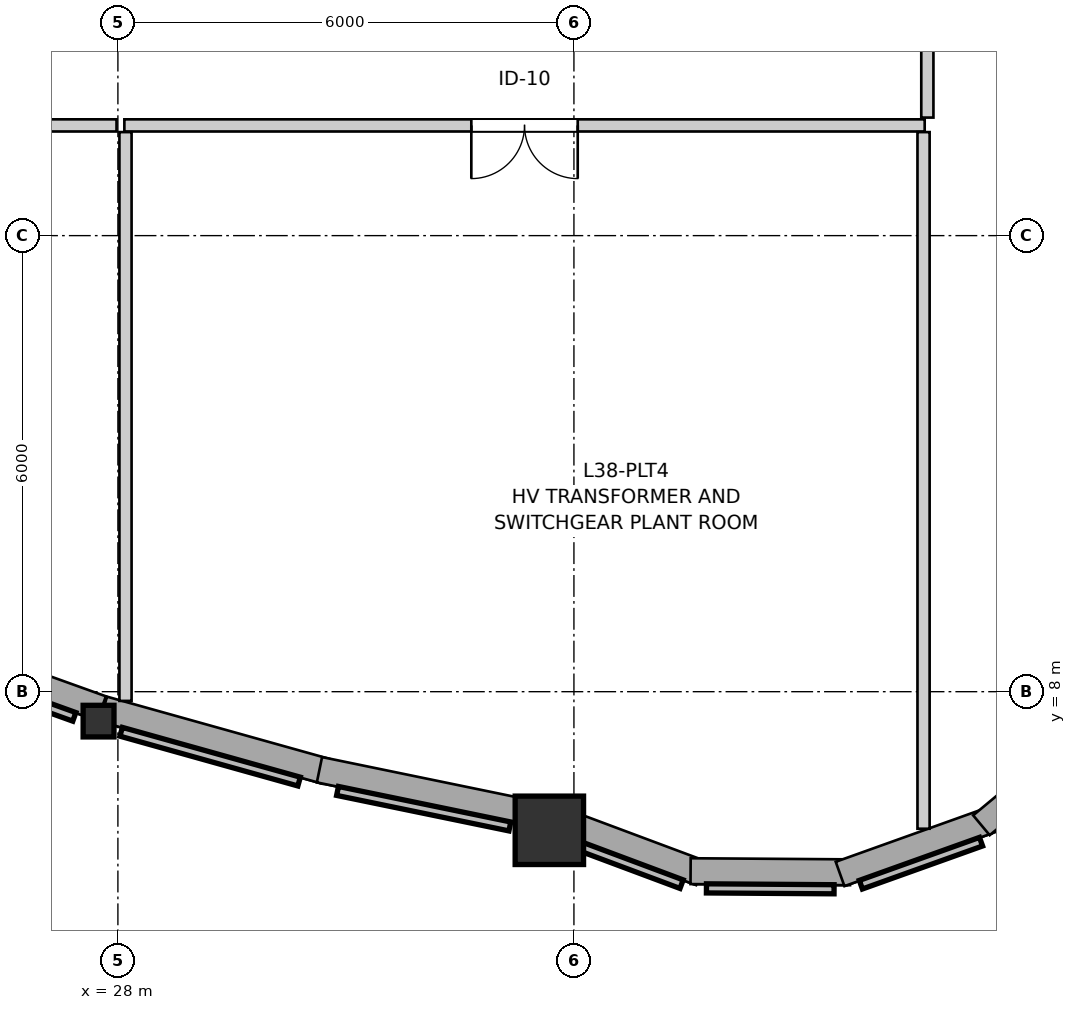
"""IFC4 building model, lengths in metres.
Left out: names, types, materials, properties, quantities, classifications, styles, units other than length and angle.
Written with IfcOpenShell. Run it as: python <this file> out.ifc"""

import sys

from ifc_helpers import new_model, si_unit, direction, frame, frame_2d, origin, origin_2d, place, context, subcontext, project, spatial, rectangle, i_section, extrude, source, transform, mapped, element, fill, save


model = new_model("IFC4")
c1 = context("Model", 3, precision=1e-05, world=origin(), true_north=direction((0.0, 1.0)))
c2 = subcontext(c1, "Body", "Model", "MODEL_VIEW")
j1 = project(units=[si_unit("LENGTHUNIT", "METRE"), si_unit("PLANEANGLEUNIT", "RADIAN")], contexts=[c1])
p1 = place(None, origin())
s1 = spatial("IfcSite", under=j1, at=p1, CompositionType="ELEMENT")
p2 = place(p1, origin())
s2 = spatial("IfcBuilding", under=s1, at=p2, CompositionType="ELEMENT")
p3 = place(p2, frame((0.0, 0.0, 128.0)))
s3 = spatial("IfcBuildingStorey", under=s2, at=p3, CompositionType="ELEMENT", Elevation=128.0)
m1 = source(origin(), c2, "Body", "SweptSolid", [
    extrude(i_section(OverallWidth=0.406, OverallDepth=0.416, WebThickness=0.027, FlangeThickness=0.044, FilletRadius=0.015, at=origin_2d()), origin(), (0.0, 0.0, 1.0), 4.75),
])
p4 = place(p3, frame((27.746, 7.613, 0.0), z_axis=(0.0, 0.0, 1.0), x_axis=(1.0, 0.0, 0.0)))
e1 = element("IfcColumn", 1, at=p4, inside=s3, PredefinedType="PILASTER", context=c2, shape_type="MappedRepresentation", body=[
    mapped(m1, transform((0.0, 0.0, 0.0), x_axis=(1.0, 0.0, 0.0), y_axis=(0.0, 1.0, 0.0), z_axis=(0.0, 0.0, 1.0), scale=1.0)),
])
m2 = source(origin(), c2, "Body", "SweptSolid", [
    extrude(rectangle(XDim=0.9, YDim=0.9, at=origin_2d()), origin(), (0.0, 0.0, 1.0), 4.75),
])
p5 = place(p3, frame((33.677, 6.176, 0.0), z_axis=(0.0, 0.0, 1.0), x_axis=(1.0, 0.0, 0.0)))
e2 = element("IfcColumn", 2, at=p5, inside=s3, PredefinedType="COLUMN", context=c2, shape_type="MappedRepresentation", body=[
    mapped(m2, transform((0.0, 0.0, 0.0), x_axis=(1.0, 0.0, 0.0), y_axis=(0.0, 1.0, 0.0), z_axis=(0.0, 0.0, 1.0), scale=1.0)),
])
p6 = place(p3, frame((24.971, 8.79, 0.0), z_axis=(0.0, 0.0, 1.0), x_axis=(0.941086086789, -0.338167084814, 0.0)))
e3 = element("IfcWall", 3, at=p6, inside=s3, PredefinedType="SOLIDWALL", context=c2, shape_type="SweptSolid", body=[
    extrude(rectangle(XDim=2.99, YDim=0.34, at=frame_2d((1.495, 0.0))), origin(), (0.0, 0.0, 1.0), 4.28),
])
p7 = place(p3, frame((27.811, 7.771, 0.0), z_axis=(0.0, 0.0, 1.0), x_axis=(0.963039905189, -0.269358758934, 0.0)))
e4 = element("IfcWall", 4, at=p7, inside=s3, PredefinedType="SOLIDWALL", context=c2, shape_type="SweptSolid", body=[
    extrude(rectangle(XDim=3.039, YDim=0.34, at=frame_2d((1.52, 0.0))), origin(), (0.0, 0.0, 1.0), 4.28),
])
p8 = place(p3, frame((30.652, 6.973, 0.0), z_axis=(0.0, 0.0, 1.0), x_axis=(0.979418300652, -0.201841007595, 0.0)))
e5 = element("IfcWall", 5, at=p8, inside=s3, PredefinedType="SOLIDWALL", context=c2, shape_type="SweptSolid", body=[
    extrude(rectangle(XDim=2.893, YDim=0.34, at=frame_2d((1.447, 0.0))), origin(), (0.0, 0.0, 1.0), 4.28),
])
p9 = place(p3, frame((33.952, 6.255, 0.0), z_axis=(0.0, 0.0, 1.0), x_axis=(0.936799566991, -0.349866504951, 0.0)))
e6 = element("IfcWall", 6, at=p9, inside=s3, PredefinedType="SOLIDWALL", context=c2, shape_type="SweptSolid", body=[
    extrude(rectangle(XDim=1.831, YDim=0.34, at=frame_2d((0.916, 0.0))), origin(), (0.0, 0.0, 1.0), 4.28),
])
for number, where, z_axis, x_axis in (
    (7, (35.535, 5.639, 0.0), (0.0, 0.0, 1.0), (1.0, -0.007, 0.0)),
    (8, (37.502, 5.602, 0.0), (0.0, 0.0, 1.0), (0.942, 0.337, 0.0)),
    (9, (39.362, 6.242, 0.0), (0.0, 0.0, 1.0), (0.768, 0.64, 0.0)),
):
    element("IfcWall", number, at=place(p3, frame(where, z_axis=z_axis, x_axis=x_axis)), inside=s3, PredefinedType="SOLIDWALL", context=c2, shape_type="SweptSolid", body=[
        extrude(rectangle(XDim=2.099, YDim=0.34, at=frame_2d((1.05, 0.0))), origin(), (0.0, 0.0, 1.0), 4.28),
    ])
p10 = place(p3, frame((38.615, 15.45, 0.0), z_axis=(0.0, 0.0, 1.0), x_axis=(-1.0, 0.0, 0.0)))
e10 = element("IfcWall", 10, at=p10, inside=s3, PredefinedType="PARTITIONING", context=c2, shape_type="SweptSolid", body=[
    extrude(rectangle(XDim=10.53, YDim=0.16, at=frame_2d((5.265, 0.0))), origin(), (0.0, 0.0, 1.0), 4.75),
])
p11 = place(p10, frame((4.565, 0.0, 0.0)))
e11 = element("IfcOpeningElement", 11, at=p11, cuts=e10, PredefinedType="OPENING", context=c2, shape_type="SweptSolid", body=[
    extrude(rectangle(XDim=1.4, YDim=2.15, at=frame_2d((0.7, 1.075))), frame((0.0, 0.09, 0.0), z_axis=(0.0, -1.0, 0.0), x_axis=(1.0, 0.0, 0.0)), (0.0, 0.0, 1.0), 0.18),
])
p12 = place(p3, frame((38.65, 22.32, 0.0), z_axis=(0.0, 0.0, 1.0), x_axis=(0.0, -1.0, 0.0)))
e12 = element("IfcWall", 12, at=p12, inside=s3, PredefinedType="PARTITIONING", context=c2, shape_type="SweptSolid", body=[
    extrude(rectangle(XDim=6.767, YDim=0.16, at=frame_2d((3.384, 0.0))), origin(), (0.0, 0.0, 1.0), 4.75),
])
p13 = place(p12, frame((2.87, 0.0, 0.0)))
e13 = element("IfcOpeningElement", 13, at=p13, cuts=e12, PredefinedType="OPENING", context=c2, shape_type="SweptSolid", body=[
    extrude(rectangle(XDim=1.1, YDim=2.15, at=frame_2d((0.55, 1.075))), frame((0.0, 0.09, 0.0), z_axis=(0.0, -1.0, 0.0), x_axis=(1.0, 0.0, 0.0)), (0.0, 0.0, 1.0), 0.18),
])
p14 = place(p3, frame((38.6, 6.197, 0.0), z_axis=(0.0, 0.0, 1.0), x_axis=(0.0, 1.0, 0.0)))
e14 = element("IfcWall", 14, at=p14, inside=s3, PredefinedType="PARTITIONING", context=c2, shape_type="SweptSolid", body=[
    extrude(rectangle(XDim=9.165, YDim=0.16, at=frame_2d((4.583, 0.0))), origin(), (0.0, 0.0, 1.0), 4.75),
])
p15 = place(p3, frame((28.1, 7.879, 0.0), z_axis=(0.0, 0.0, 1.0), x_axis=(0.0, 1.0, 0.0)))
e15 = element("IfcWall", 15, at=p15, inside=s3, PredefinedType="PARTITIONING", context=c2, shape_type="SweptSolid", body=[
    extrude(rectangle(XDim=7.483, YDim=0.16, at=frame_2d((3.742, 0.0))), origin(), (0.0, 0.0, 1.0), 2.918),
])
p16 = place(p3, frame((22.138, 15.45, 0.0), z_axis=(0.0, 0.0, 1.0), x_axis=(1.0, 0.0, 0.0)))
e16 = element("IfcWall", 16, at=p16, inside=s3, PredefinedType="PARTITIONING", context=c2, shape_type="SweptSolid", body=[
    extrude(rectangle(XDim=5.844, YDim=0.16, at=frame_2d((2.922, 0.0))), origin(), (0.0, 0.0, 1.0), 4.75),
])
m3 = source(origin(), c2, "Body", "SweptSolid", [
    extrude(rectangle(XDim=1.4, YDim=2.15, at=frame_2d((0.7, 1.075))), frame((0.0, 0.025, 0.0), z_axis=(0.0, -1.0, 0.0), x_axis=(1.0, 0.0, 0.0)), (0.0, 0.0, 1.0), 0.05),
])
p17 = place(p11, origin())
e17 = element("IfcDoor", 17, at=p17, inside=s3, OperationType="DOUBLE_DOOR_SINGLE_SWING", PredefinedType="DOOR", context=c2, shape_type="MappedRepresentation", body=[
    mapped(m3, transform((0.0, 0.0, 0.0), x_axis=(1.0, 0.0, 0.0), y_axis=(0.0, 1.0, 0.0), z_axis=(0.0, 0.0, 1.0), scale=1.0)),
])
fill(e11, e17)
save(model, sys.argv[1])
